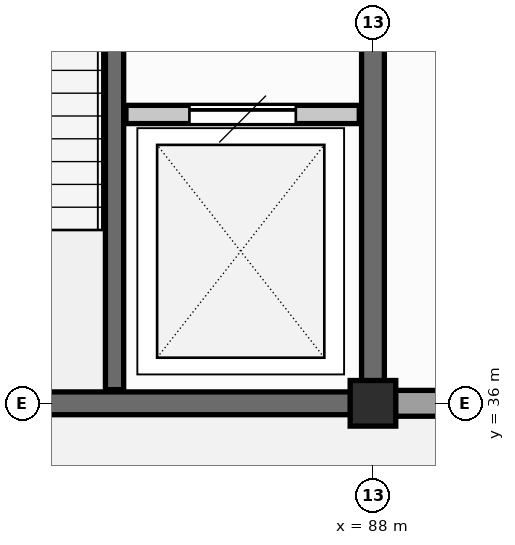
"""IFC4 building model, lengths in metres.
Left out: names, types, materials, properties, quantities, classifications, styles, units other than length and angle.
Written with IfcOpenShell. Run it as: python <this file> out.ifc"""

import sys

from ifc_helpers import new_model, si_unit, direction, frame, frame_2d, origin, origin_2d, place, context, subcontext, project, spatial, rectangle, extrude, element, fill, save


model = new_model("IFC4")
c1 = context("Model", 3, precision=1e-05, world=origin(), true_north=direction((0.0, 1.0)))
c2 = subcontext(c1, "Body", "Model", "MODEL_VIEW")
j1 = project(units=[si_unit("LENGTHUNIT", "METRE"), si_unit("PLANEANGLEUNIT", "RADIAN")], contexts=[c1])
p1 = place(None, origin())
s1 = spatial("IfcSite", under=j1, at=p1, CompositionType="ELEMENT")
p2 = place(p1, origin())
s2 = spatial("IfcBuilding", under=s1, at=p2, CompositionType="ELEMENT")
p3 = place(p2, frame((0.0, 0.0, 4.8)))
s3 = spatial("IfcBuildingStorey", under=s2, at=p3, CompositionType="ELEMENT", Elevation=4.8)
p4 = place(p3, frame((88.0, 36.0, 0.0), z_axis=(0.0, 0.0, 1.0), x_axis=(1.0, 0.0, 0.0)))
e1 = element("IfcColumn", 1, at=p4, inside=s3, PredefinedType="COLUMN", context=c2, shape_type="SweptSolid", body=[
    extrude(rectangle(XDim=0.6, YDim=0.6, at=origin_2d()), origin(), (0.0, 0.0, 1.0), 4.2),
])
p5 = place(p3, frame((88.295, 36.0, 0.0), z_axis=(0.0, 0.0, 1.0), x_axis=(1.0, 0.0, 0.0)))
e2 = element("IfcWall", 2, at=p5, inside=s3, PredefinedType="SOLIDWALL", context=c2, shape_type="SweptSolid", body=[
    extrude(rectangle(XDim=7.41, YDim=0.34, at=frame_2d((3.705, 0.0))), origin(), (0.0, 0.0, 1.0), 3.05),
])
p6 = place(p3, frame((80.295, 36.0, 0.0), z_axis=(0.0, 0.0, 1.0), x_axis=(1.0, 0.0, 0.0)))
e3 = element("IfcWall", 3, at=p6, inside=s3, PredefinedType="SHEAR", context=c2, shape_type="SweptSolid", body=[
    extrude(rectangle(XDim=7.41, YDim=0.3, at=frame_2d((3.705, 0.0))), origin(), (0.0, 0.0, 1.0), 3.905),
])
p7 = place(p3, frame((88.0, 36.295, 0.0), z_axis=(0.0, 0.0, 1.0), x_axis=(0.0, 1.0, 0.0)))
e4 = element("IfcWall", 4, at=p7, inside=s3, PredefinedType="SHEAR", context=c2, shape_type="SweptSolid", body=[
    extrude(rectangle(XDim=8.41, YDim=0.3, at=frame_2d((4.205, 0.0))), origin(), (0.0, 0.0, 1.0), 3.905),
])
p8 = place(p3, frame((84.6, 36.18, 0.0), z_axis=(0.0, 0.0, 1.0), x_axis=(0.0, 1.0, 0.0)))
e5 = element("IfcWall", 5, at=p8, inside=s3, PredefinedType="SHEAR", context=c2, shape_type="SweptSolid", body=[
    extrude(rectangle(XDim=8.64, YDim=0.24, at=frame_2d((4.32, 0.0))), origin(), (0.0, 0.0, 1.0), 3.905),
])
p9 = place(p8, frame((6.02, 0.0, 0.0)))
e6 = element("IfcOpeningElement", 6, at=p9, cuts=e5, PredefinedType="OPENING", context=c2, shape_type="SweptSolid", body=[
    extrude(rectangle(XDim=1.35, YDim=2.2, at=frame_2d((0.675, 1.1))), frame((0.0, 0.13, 0.0), z_axis=(0.0, -1.0, 0.0), x_axis=(1.0, 0.0, 0.0)), (0.0, 0.0, 1.0), 0.26),
])
p10 = place(p8, frame((7.68, 0.0, 0.0)))
e7 = element("IfcOpeningElement", 7, at=p10, cuts=e5, PredefinedType="OPENING", context=c2, shape_type="SweptSolid", body=[
    extrude(rectangle(XDim=0.88, YDim=2.02, at=frame_2d((0.44, 1.01))), frame((0.0, 0.13, 0.0), z_axis=(0.0, -1.0, 0.0), x_axis=(1.0, 0.0, 0.0)), (0.0, 0.0, 1.0), 0.26),
])
p11 = place(p3, frame((84.75, 39.8, 0.0), z_axis=(0.0, 0.0, 1.0), x_axis=(1.0, 0.0, 0.0)))
e8 = element("IfcWall", 8, at=p11, inside=s3, PredefinedType="SHEAR", context=c2, shape_type="SweptSolid", body=[
    extrude(rectangle(XDim=3.07, YDim=0.24, at=frame_2d((1.535, 0.0))), origin(), (0.0, 0.0, 1.0), 3.255),
])
p12 = place(p11, frame((0.835, 0.0, 0.0)))
e9 = element("IfcOpeningElement", 9, at=p12, cuts=e8, PredefinedType="OPENING", context=c2, shape_type="SweptSolid", body=[
    extrude(rectangle(XDim=1.4, YDim=2.3, at=frame_2d((0.7, 1.15))), frame((0.0, 0.13, 0.0), z_axis=(0.0, -1.0, 0.0), x_axis=(1.0, 0.0, 0.0)), (0.0, 0.0, 1.0), 0.26),
])
p13 = place(p12, origin())
e10 = element("IfcDoor", 10, at=p13, inside=s3, OperationType="SLIDING_TO_LEFT", PredefinedType="DOOR", context=c2, shape_type="SweptSolid", body=[
    extrude(rectangle(XDim=1.4, YDim=2.3, at=frame_2d((0.7, 1.15))), frame((0.0, 0.025, 0.0), z_axis=(0.0, -1.0, 0.0), x_axis=(1.0, 0.0, 0.0)), (0.0, 0.0, 1.0), 0.05),
])
fill(e9, e10)
save(model, sys.argv[1])
